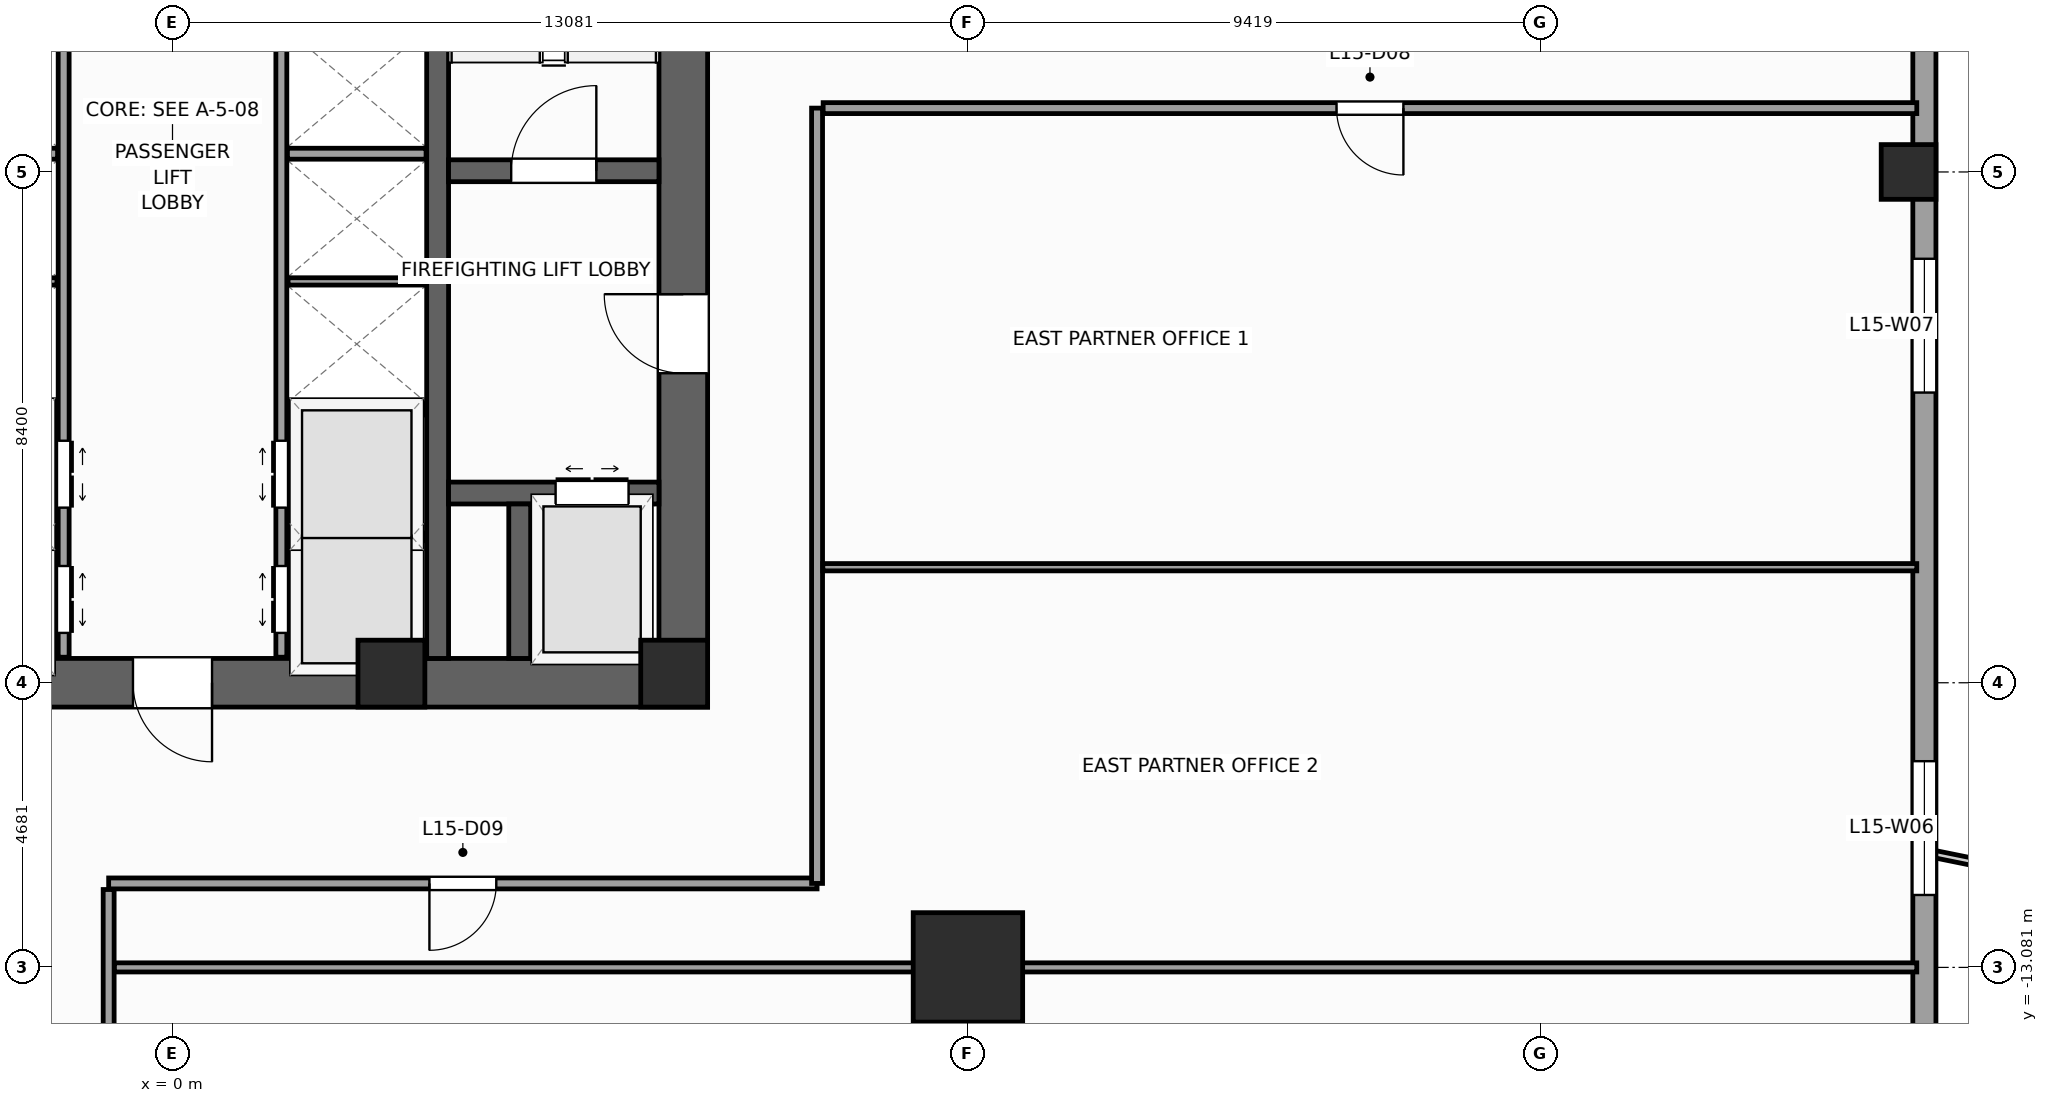
"""IFC4 building model, lengths in metres.
Left out: names, types, materials, properties, quantities, classifications, styles, units other than length and angle.
Written with IfcOpenShell. Run it as: python <this file> out.ifc"""

import sys

from ifc_helpers import new_model, si_unit, direction, frame, frame_2d, origin, origin_2d, place, context, subcontext, project, spatial, rectangle, extrude, source, transform, mapped, element, fill, save


model = new_model("IFC4")
c1 = context("Model", 3, precision=1e-05, world=origin(), true_north=direction((0.0, 1.0)))
c2 = subcontext(c1, "Body", "Model", "MODEL_VIEW")
j1 = project(units=[si_unit("LENGTHUNIT", "METRE"), si_unit("PLANEANGLEUNIT", "RADIAN")], contexts=[c1])
p1 = place(None, origin())
s1 = spatial("IfcSite", under=j1, at=p1, CompositionType="ELEMENT")
p2 = place(p1, origin())
s2 = spatial("IfcBuilding", under=s1, at=p2, CompositionType="ELEMENT")
p3 = place(p2, frame((0.0, 0.0, 66.0)))
s3 = spatial("IfcBuildingStorey", under=s2, at=p3, CompositionType="ELEMENT", Elevation=66.0)
p4 = place(p3, frame((-8.8, -8.4, 0.0), z_axis=(0.0, 0.0, 1.0), x_axis=(1.0, 0.0, 0.0)))
e1 = element("IfcWall", 1, at=p4, inside=s3, PredefinedType="SHEAR", context=c2, shape_type="SweptSolid", body=[
    extrude(rectangle(XDim=17.6, YDim=0.8, at=frame_2d((8.8, 0.0))), origin(), (0.0, 0.0, 1.0), 4.0),
])
p5 = place(p4, frame((8.15, 0.0, 0.0)))
e2 = element("IfcOpeningElement", 2, at=p5, cuts=e1, PredefinedType="OPENING", context=c2, shape_type="SweptSolid", body=[
    extrude(rectangle(XDim=1.3, YDim=2.2, at=frame_2d((0.65, 1.1))), frame((0.0, 0.41, 0.0), z_axis=(0.0, -1.0, 0.0), x_axis=(1.0, 0.0, 0.0)), (0.0, 0.0, 1.0), 0.82),
])
p6 = place(p3, frame((8.4, -8.0, 0.0), z_axis=(0.0, 0.0, 1.0), x_axis=(0.0, 1.0, 0.0)))
e3 = element("IfcWall", 3, at=p6, inside=s3, PredefinedType="SHEAR", context=c2, shape_type="SweptSolid", body=[
    extrude(rectangle(XDim=16.0, YDim=0.8, at=frame_2d((8.0, 0.0))), origin(), (0.0, 0.0, 1.0), 4.0),
])
p7 = place(p6, frame((4.69, 0.0, 0.0)))
e4 = element("IfcOpeningElement", 4, at=p7, cuts=e3, PredefinedType="OPENING", context=c2, shape_type="SweptSolid", body=[
    extrude(rectangle(XDim=1.3, YDim=2.2, at=frame_2d((0.65, 1.1))), frame((0.0, 0.41, 0.0), z_axis=(0.0, -1.0, 0.0), x_axis=(1.0, 0.0, 0.0)), (0.0, 0.0, 1.0), 0.82),
])
p8 = place(p3, frame((4.36, -8.0, 0.0), z_axis=(0.0, 0.0, 1.0), x_axis=(0.0, 1.0, 0.0)))
e5 = element("IfcWall", 5, at=p8, inside=s3, PredefinedType="SHEAR", context=c2, shape_type="SweptSolid", body=[
    extrude(rectangle(XDim=16.0, YDim=0.36, at=frame_2d((8.0, 0.0))), origin(), (0.0, 0.0, 1.0), 4.0),
])
p9 = place(p3, frame((4.54, 0.02, 0.0), z_axis=(0.0, 0.0, 1.0), x_axis=(1.0, 0.0, 0.0)))
e6 = element("IfcWall", 6, at=p9, inside=s3, PredefinedType="SHEAR", context=c2, shape_type="SweptSolid", body=[
    extrude(rectangle(XDim=3.46, YDim=0.36, at=frame_2d((1.73, 0.0))), origin(), (0.0, 0.0, 1.0), 4.0),
])
p10 = place(p9, frame((1.03, 0.0, 0.0)))
e7 = element("IfcOpeningElement", 7, at=p10, cuts=e6, PredefinedType="OPENING", context=c2, shape_type="SweptSolid", body=[
    extrude(rectangle(XDim=1.4, YDim=2.2, at=frame_2d((0.7, 1.1))), frame((0.0, 0.19, 0.0), z_axis=(0.0, -1.0, 0.0), x_axis=(1.0, 0.0, 0.0)), (0.0, 0.0, 1.0), 0.38),
])
p11 = place(p3, frame((4.54, -5.28, 0.0), z_axis=(0.0, 0.0, 1.0), x_axis=(1.0, 0.0, 0.0)))
e8 = element("IfcWall", 8, at=p11, inside=s3, PredefinedType="SHEAR", context=c2, shape_type="SweptSolid", body=[
    extrude(rectangle(XDim=3.46, YDim=0.36, at=frame_2d((1.73, 0.0))), origin(), (0.0, 0.0, 1.0), 4.0),
])
p12 = place(p11, frame((1.76, 0.0, 0.0)))
e9 = element("IfcOpeningElement", 9, at=p12, cuts=e8, PredefinedType="OPENING", context=c2, shape_type="SweptSolid", body=[
    extrude(rectangle(XDim=1.2, YDim=2.25, at=frame_2d((0.6, 1.125))), frame((0.0, 0.19, 0.0), z_axis=(0.0, -1.0, 0.0), x_axis=(1.0, 0.0, 0.0)), (0.0, 0.0, 1.0), 0.38),
])
p13 = place(p3, frame((5.71, -8.0, 0.0), z_axis=(0.0, 0.0, 1.0), x_axis=(0.0, 1.0, 0.0)))
e10 = element("IfcWall", 10, at=p13, inside=s3, PredefinedType="SHEAR", context=c2, shape_type="SweptSolid", body=[
    extrude(rectangle(XDim=2.54, YDim=0.36, at=frame_2d((1.27, 0.0))), origin(), (0.0, 0.0, 1.0), 4.0),
])
m1 = source(origin(), c2, "Body", "SweptSolid", [
    extrude(rectangle(XDim=1.1, YDim=1.1, at=origin_2d()), origin(), (0.0, 0.0, 1.0), 4.0),
])
for number, where, z_axis, x_axis in (
    (11, (8.25, -8.25, 0.0), (0.0, 0.0, 1.0), (1.0, 0.0, 0.0)),
    (12, (3.6, -8.25, 0.0), (0.0, 0.0, 1.0), (1.0, 0.0, 0.0)),
):
    element("IfcColumn", number, at=place(p3, frame(where, z_axis=z_axis, x_axis=x_axis)), inside=s3, PredefinedType="PILASTER", context=c2, shape_type="MappedRepresentation", body=[
        mapped(m1, transform((0.0, 0.0, 0.0), scale=1.0)),
    ])
m2 = source(origin(), c2, "Body", "SweptSolid", [
    extrude(rectangle(XDim=1.8, YDim=1.8, at=origin_2d()), origin(), (0.0, 0.0, 1.0), 4.0),
])
p14 = place(p3, frame((13.081, -13.081, 0.0), z_axis=(0.0, 0.0, 1.0), x_axis=(1.0, 0.0, 0.0)))
e13 = element("IfcColumn", 13, at=p14, inside=s3, PredefinedType="COLUMN", context=c2, shape_type="MappedRepresentation", body=[
    mapped(m2, transform((0.0, 0.0, 0.0), scale=1.0)),
])
m3 = source(origin(), c2, "Body", "SweptSolid", [
    extrude(rectangle(XDim=0.9, YDim=0.9, at=origin_2d()), origin(), (0.0, 0.0, 1.0), 4.0),
])
p15 = place(p3, frame((28.55, 0.0, 0.0), z_axis=(0.0, 0.0, 1.0), x_axis=(1.0, 0.0, 0.0)))
e14 = element("IfcColumn", 14, at=p15, inside=s3, PredefinedType="COLUMN", context=c2, shape_type="MappedRepresentation", body=[
    mapped(m3, transform((0.0, 0.0, 0.0), scale=1.0)),
])
p16 = place(p3, frame((28.81, -25.69, 0.0), z_axis=(0.0, 0.0, 1.0), x_axis=(0.0, 1.0, 0.0)))
e15 = element("IfcWall", 15, at=p16, inside=s3, PredefinedType="STANDARD", context=c2, shape_type="SweptSolid", body=[
    extrude(rectangle(XDim=51.38, YDim=0.38, at=frame_2d((25.69, 0.0))), origin(), (0.0, 0.0, 1.0), 3.12),
])
p17 = place(p16, frame((5.466, 0.0, 0.49)))
e16 = element("IfcOpeningElement", 16, at=p17, cuts=e15, PredefinedType="OPENING", context=c2, shape_type="SweptSolid", body=[
    extrude(rectangle(XDim=1.4, YDim=2.4, at=frame_2d((0.7, 1.2))), frame((0.0, 0.2, 0.0), z_axis=(0.0, -1.0, 0.0), x_axis=(1.0, 0.0, 0.0)), (0.0, 0.0, 1.0), 0.4),
])
p18 = place(p16, frame((13.8, 0.0, 0.49)))
e17 = element("IfcOpeningElement", 17, at=p18, cuts=e15, PredefinedType="OPENING", context=c2, shape_type="SweptSolid", body=[
    extrude(rectangle(XDim=2.2, YDim=2.4, at=frame_2d((1.1, 1.2))), frame((0.0, 0.2, 0.0), z_axis=(0.0, -1.0, 0.0), x_axis=(1.0, 0.0, 0.0)), (0.0, 0.0, 1.0), 0.4),
])
p19 = place(p16, frame((22.062, 0.0, 0.49)))
e18 = element("IfcOpeningElement", 18, at=p19, cuts=e15, PredefinedType="OPENING", context=c2, shape_type="SweptSolid", body=[
    extrude(rectangle(XDim=2.2, YDim=2.4, at=frame_2d((1.1, 1.2))), frame((0.0, 0.2, 0.0), z_axis=(0.0, -1.0, 0.0), x_axis=(1.0, 0.0, 0.0)), (0.0, 0.0, 1.0), 0.4),
])
p20 = place(p16, frame((33.838, 0.0, 0.49)))
e19 = element("IfcOpeningElement", 19, at=p20, cuts=e15, PredefinedType="OPENING", context=c2, shape_type="SweptSolid", body=[
    extrude(rectangle(XDim=2.2, YDim=2.4, at=frame_2d((1.1, 1.2))), frame((0.0, 0.2, 0.0), z_axis=(0.0, -1.0, 0.0), x_axis=(1.0, 0.0, 0.0)), (0.0, 0.0, 1.0), 0.4),
])
p21 = place(p16, frame((43.487, 0.0, 0.49)))
e20 = element("IfcOpeningElement", 20, at=p21, cuts=e15, PredefinedType="OPENING", context=c2, shape_type="SweptSolid", body=[
    extrude(rectangle(XDim=1.4, YDim=2.4, at=frame_2d((0.7, 1.2))), frame((0.0, 0.2, 0.0), z_axis=(0.0, -1.0, 0.0), x_axis=(1.0, 0.0, 0.0)), (0.0, 0.0, 1.0), 0.4),
])
p22 = place(p3, frame((-1.79, -7.98, 0.0), z_axis=(0.0, 0.0, 1.0), x_axis=(0.0, 1.0, 0.0)))
e21 = element("IfcWall", 21, at=p22, inside=s3, PredefinedType="PARTITIONING", context=c2, shape_type="SweptSolid", body=[
    extrude(rectangle(XDim=12.38, YDim=0.18, at=frame_2d((6.19, 0.0))), origin(), (0.0, 0.0, 1.0), 3.72),
])
p23 = place(p22, frame((0.4, 0.0, 0.0)))
e22 = element("IfcOpeningElement", 22, at=p23, cuts=e21, PredefinedType="OPENING", context=c2, shape_type="SweptSolid", body=[
    extrude(rectangle(XDim=1.1, YDim=2.2, at=frame_2d((0.55, 1.1))), frame((0.0, 0.1, 0.0), z_axis=(0.0, -1.0, 0.0), x_axis=(1.0, 0.0, 0.0)), (0.0, 0.0, 1.0), 0.2),
])
p24 = place(p22, frame((2.46, 0.0, 0.0)))
e23 = element("IfcOpeningElement", 23, at=p24, cuts=e21, PredefinedType="OPENING", context=c2, shape_type="SweptSolid", body=[
    extrude(rectangle(XDim=1.1, YDim=2.2, at=frame_2d((0.55, 1.1))), frame((0.0, 0.1, 0.0), z_axis=(0.0, -1.0, 0.0), x_axis=(1.0, 0.0, 0.0)), (0.0, 0.0, 1.0), 0.2),
])
p25 = place(p3, frame((1.79, -7.98, 0.0), z_axis=(0.0, 0.0, 1.0), x_axis=(0.0, 1.0, 0.0)))
e24 = element("IfcWall", 24, at=p25, inside=s3, PredefinedType="PARTITIONING", context=c2, shape_type="SweptSolid", body=[
    extrude(rectangle(XDim=12.38, YDim=0.18, at=frame_2d((6.19, 0.0))), origin(), (0.0, 0.0, 1.0), 3.72),
])
p26 = place(p25, frame((0.4, 0.0, 0.0)))
e25 = element("IfcOpeningElement", 25, at=p26, cuts=e24, PredefinedType="OPENING", context=c2, shape_type="SweptSolid", body=[
    extrude(rectangle(XDim=1.1, YDim=2.2, at=frame_2d((0.55, 1.1))), frame((0.0, 0.1, 0.0), z_axis=(0.0, -1.0, 0.0), x_axis=(1.0, 0.0, 0.0)), (0.0, 0.0, 1.0), 0.2),
])
p27 = place(p25, frame((2.46, 0.0, 0.0)))
e26 = element("IfcOpeningElement", 26, at=p27, cuts=e24, PredefinedType="OPENING", context=c2, shape_type="SweptSolid", body=[
    extrude(rectangle(XDim=1.1, YDim=2.2, at=frame_2d((0.55, 1.1))), frame((0.0, 0.1, 0.0), z_axis=(0.0, -1.0, 0.0), x_axis=(1.0, 0.0, 0.0)), (0.0, 0.0, 1.0), 0.2),
])
for number, where, z_axis, x_axis in (
    (27, (-4.17, -3.9, 0.0), (0.0, 0.0, 1.0), (1.0, 0.0, 0.0)),
    (28, (1.89, -3.9, 0.0), (0.0, 0.0, 1.0), (1.0, 0.0, 0.0)),
    (29, (-4.17, 0.3, 0.0), (0.0, 0.0, 1.0), (1.0, 0.0, 0.0)),
    (30, (1.89, 0.3, 0.0), (0.0, 0.0, 1.0), (1.0, 0.0, 0.0)),
):
    element("IfcWall", number, at=place(p3, frame(where, z_axis=z_axis, x_axis=x_axis)), inside=s3, PredefinedType="PARTITIONING", context=c2, shape_type="SweptSolid", body=[
        extrude(rectangle(XDim=2.28, YDim=0.18, at=frame_2d((1.14, 0.0))), origin(), (0.0, 0.0, 1.0), 3.72),
    ])
for number, where, z_axis, x_axis in (
    (31, (-4.16, -6.0, 0.0), (0.0, 0.0, 1.0), (1.0, 0.0, 0.0)),
    (32, (1.9, -6.0, 0.0), (0.0, 0.0, 1.0), (1.0, 0.0, 0.0)),
    (33, (-4.16, -1.8, 0.0), (0.0, 0.0, 1.0), (1.0, 0.0, 0.0)),
    (34, (1.9, -1.8, 0.0), (0.0, 0.0, 1.0), (1.0, 0.0, 0.0)),
):
    element("IfcWall", number, at=place(p3, frame(where, z_axis=z_axis, x_axis=x_axis)), inside=s3, PredefinedType="PARTITIONING", context=c2, shape_type="SweptSolid", body=[
        extrude(rectangle(XDim=2.26, YDim=0.12, at=frame_2d((1.13, 0.0))), origin(), (0.0, 0.0, 1.0), 3.72),
    ])
p28 = place(p3, frame((-1.05, -11.7, 0.0), z_axis=(0.0, 0.0, 1.0), x_axis=(1.0, 0.0, 0.0)))
e35 = element("IfcWall", 35, at=p28, inside=s3, PredefinedType="PARTITIONING", context=c2, shape_type="SweptSolid", body=[
    extrude(rectangle(XDim=11.65, YDim=0.18, at=frame_2d((5.825, 0.0))), origin(), (0.0, 0.0, 1.0), 3.72),
])
p29 = place(p28, frame((5.275, 0.0, 0.0)))
e36 = element("IfcOpeningElement", 36, at=p29, cuts=e35, PredefinedType="OPENING", context=c2, shape_type="SweptSolid", body=[
    extrude(rectangle(XDim=1.1, YDim=2.2, at=frame_2d((0.55, 1.1))), frame((0.0, 0.1, 0.0), z_axis=(0.0, -1.0, 0.0), x_axis=(1.0, 0.0, 0.0)), (0.0, 0.0, 1.0), 0.2),
])
p30 = place(p3, frame((10.6, -11.7, 0.0), z_axis=(0.0, 0.0, 1.0), x_axis=(0.0, 1.0, 0.0)))
e37 = element("IfcWall", 37, at=p30, inside=s3, PredefinedType="PARTITIONING", context=c2, shape_type="SweptSolid", body=[
    extrude(rectangle(XDim=12.75, YDim=0.18, at=frame_2d((6.375, 0.0))), origin(), (0.0, 0.0, 1.0), 3.72),
])
p31 = place(p3, frame((10.7, 1.05, 0.0), z_axis=(0.0, 0.0, 1.0), x_axis=(1.0, 0.0, 0.0)))
e38 = element("IfcWall", 38, at=p31, inside=s3, PredefinedType="PARTITIONING", context=c2, shape_type="SweptSolid", body=[
    extrude(rectangle(XDim=17.985, YDim=0.18, at=frame_2d((8.993, 0.0))), origin(), (0.0, 0.0, 1.0), 3.72),
])
p32 = place(p31, frame((8.442, 0.0, 0.0)))
e39 = element("IfcOpeningElement", 39, at=p32, cuts=e38, PredefinedType="OPENING", context=c2, shape_type="SweptSolid", body=[
    extrude(rectangle(XDim=1.1, YDim=2.2, at=frame_2d((0.55, 1.1))), frame((0.0, 0.1, 0.0), z_axis=(0.0, -1.0, 0.0), x_axis=(1.0, 0.0, 0.0)), (0.0, 0.0, 1.0), 0.2),
])
p33 = place(p3, frame((-1.05, -28.685, 0.0), z_axis=(0.0, 0.0, 1.0), x_axis=(0.0, 1.0, 0.0)))
e40 = element("IfcWall", 40, at=p33, inside=s3, PredefinedType="PARTITIONING", context=c2, shape_type="SweptSolid", body=[
    extrude(rectangle(XDim=16.885, YDim=0.18, at=frame_2d((8.442, 0.0))), origin(), (0.0, 0.0, 1.0), 3.72),
])
p34 = place(p33, frame((7.417, 0.0, 0.0)))
e41 = element("IfcOpeningElement", 41, at=p34, cuts=e40, PredefinedType="OPENING", context=c2, shape_type="SweptSolid", body=[
    extrude(rectangle(XDim=1.1, YDim=2.2, at=frame_2d((0.55, 1.1))), frame((0.0, 0.1, 0.0), z_axis=(0.0, -1.0, 0.0), x_axis=(1.0, 0.0, 0.0)), (0.0, 0.0, 1.0), 0.2),
])
p35 = place(p3, frame((-0.955, -13.081, 0.0), z_axis=(0.0, 0.0, 1.0), x_axis=(1.0, 0.0, 0.0)))
e42 = element("IfcWall", 42, at=p35, inside=s3, PredefinedType="PARTITIONING", context=c2, shape_type="SweptSolid", body=[
    extrude(rectangle(XDim=29.64, YDim=0.15, at=frame_2d((14.82, 0.0))), origin(), (0.0, 0.0, 1.0), 2.712),
])
p36 = place(p3, frame((10.695, -6.5, 0.0), z_axis=(0.0, 0.0, 1.0), x_axis=(1.0, 0.0, 0.0)))
e43 = element("IfcWall", 43, at=p36, inside=s3, PredefinedType="PARTITIONING", context=c2, shape_type="SweptSolid", body=[
    extrude(rectangle(XDim=17.99, YDim=0.12, at=frame_2d((8.995, 0.0))), origin(), (0.0, 0.0, 1.0), 3.72),
])
m4 = source(origin(), c2, "Body", "SweptSolid", [
    extrude(rectangle(XDim=2.2, YDim=2.4, at=frame_2d((1.1, 1.2))), frame((0.0, 0.03, 0.0), z_axis=(0.0, -1.0, 0.0), x_axis=(1.0, 0.0, 0.0)), (0.0, 0.0, 1.0), 0.06),
])
p37 = place(p18, origin())
e44 = element("IfcWindow", 44, at=p37, inside=s3, PartitioningType="SINGLE_PANEL", PredefinedType="WINDOW", context=c2, shape_type="MappedRepresentation", body=[
    mapped(m4, transform((0.0, 0.0, 0.0), scale=1.0)),
])
fill(e17, e44)
p38 = place(p19, origin())
e45 = element("IfcWindow", 45, at=p38, inside=s3, PartitioningType="SINGLE_PANEL", PredefinedType="WINDOW", context=c2, shape_type="MappedRepresentation", body=[
    mapped(m4, transform((0.0, 0.0, 0.0), scale=1.0)),
])
fill(e18, e45)
m5 = source(origin(), c2, "Body", "SweptSolid", [
    extrude(rectangle(XDim=1.4, YDim=2.2, at=frame_2d((0.7, 1.1))), frame((0.0, 0.025, 0.0), z_axis=(0.0, -1.0, 0.0), x_axis=(1.0, 0.0, 0.0)), (0.0, 0.0, 1.0), 0.05),
])
p39 = place(p10, origin())
e46 = element("IfcDoor", 46, at=p39, inside=s3, OperationType="SINGLE_SWING_RIGHT", PredefinedType="DOOR", context=c2, shape_type="MappedRepresentation", body=[
    mapped(m5, transform((0.0, 0.0, 0.0), scale=1.0)),
])
fill(e7, e46)
m6 = source(origin(), c2, "Body", "SweptSolid", [
    extrude(rectangle(XDim=1.3, YDim=2.2, at=frame_2d((0.65, 1.1))), frame((0.0, 0.025, 0.0), z_axis=(0.0, -1.0, 0.0), x_axis=(1.0, 0.0, 0.0)), (0.0, 0.0, 1.0), 0.05),
])
p40 = place(p7, origin())
e47 = element("IfcDoor", 47, at=p40, inside=s3, OperationType="SINGLE_SWING_RIGHT", PredefinedType="DOOR", context=c2, shape_type="MappedRepresentation", body=[
    mapped(m6, transform((0.0, 0.0, 0.0), scale=1.0)),
])
fill(e4, e47)
p41 = place(p5, frame((1.3, 0.0, 0.0), z_axis=(0.0, 0.0, 1.0), x_axis=(-1.0, 0.0, 0.0)))
e48 = element("IfcDoor", 48, at=p41, inside=s3, OperationType="SINGLE_SWING_RIGHT", PredefinedType="DOOR", context=c2, shape_type="MappedRepresentation", body=[
    mapped(m6, transform((0.0, 0.0, 0.0), scale=1.0)),
])
fill(e2, e48)
m7 = source(origin(), c2, "Body", "SweptSolid", [
    extrude(rectangle(XDim=1.2, YDim=2.25, at=frame_2d((0.6, 1.125))), frame((0.0, 0.025, 0.0), z_axis=(0.0, -1.0, 0.0), x_axis=(1.0, 0.0, 0.0)), (0.0, 0.0, 1.0), 0.05),
])
p42 = place(p12, origin())
e49 = element("IfcDoor", 49, at=p42, inside=s3, OperationType="DOUBLE_DOOR_SLIDING", PredefinedType="DOOR", context=c2, shape_type="MappedRepresentation", body=[
    mapped(m7, transform((0.0, 0.0, 0.0), scale=1.0)),
])
fill(e9, e49)
m8 = source(origin(), c2, "Body", "SweptSolid", [
    extrude(rectangle(XDim=1.1, YDim=2.2, at=frame_2d((0.55, 1.1))), frame((0.0, 0.025, 0.0), z_axis=(0.0, -1.0, 0.0), x_axis=(1.0, 0.0, 0.0)), (0.0, 0.0, 1.0), 0.05),
])
p43 = place(p23, frame((1.1, 0.0, 0.0), z_axis=(0.0, 0.0, 1.0), x_axis=(-1.0, 0.0, 0.0)))
e50 = element("IfcDoor", 50, at=p43, inside=s3, OperationType="DOUBLE_DOOR_SLIDING", PredefinedType="DOOR", context=c2, shape_type="MappedRepresentation", body=[
    mapped(m8, transform((0.0, 0.0, 0.0), scale=1.0)),
])
fill(e22, e50)
p44 = place(p24, frame((1.1, 0.0, 0.0), z_axis=(0.0, 0.0, 1.0), x_axis=(-1.0, 0.0, 0.0)))
e51 = element("IfcDoor", 51, at=p44, inside=s3, OperationType="DOUBLE_DOOR_SLIDING", PredefinedType="DOOR", context=c2, shape_type="MappedRepresentation", body=[
    mapped(m8, transform((0.0, 0.0, 0.0), scale=1.0)),
])
fill(e23, e51)
p45 = place(p26, origin())
e52 = element("IfcDoor", 52, at=p45, inside=s3, OperationType="DOUBLE_DOOR_SLIDING", PredefinedType="DOOR", context=c2, shape_type="MappedRepresentation", body=[
    mapped(m8, transform((0.0, 0.0, 0.0), scale=1.0)),
])
fill(e25, e52)
p46 = place(p27, origin())
e53 = element("IfcDoor", 53, at=p46, inside=s3, OperationType="DOUBLE_DOOR_SLIDING", PredefinedType="DOOR", context=c2, shape_type="MappedRepresentation", body=[
    mapped(m8, transform((0.0, 0.0, 0.0), scale=1.0)),
])
fill(e26, e53)
p47 = place(p32, frame((1.1, 0.0, 0.0), z_axis=(0.0, 0.0, 1.0), x_axis=(-1.0, 0.0, 0.0)))
e54 = element("IfcDoor", 54, at=p47, inside=s3, OperationType="SINGLE_SWING_RIGHT", PredefinedType="DOOR", context=c2, shape_type="MappedRepresentation", body=[
    mapped(m8, transform((0.0, 0.0, 0.0), scale=1.0)),
])
fill(e39, e54)
p48 = place(p29, frame((1.1, 0.0, 0.0), z_axis=(0.0, 0.0, 1.0), x_axis=(-1.0, 0.0, 0.0)))
e55 = element("IfcDoor", 55, at=p48, inside=s3, OperationType="SINGLE_SWING_LEFT", PredefinedType="DOOR", context=c2, shape_type="MappedRepresentation", body=[
    mapped(m8, transform((0.0, 0.0, 0.0), scale=1.0)),
])
fill(e36, e55)
save(model, sys.argv[1])
